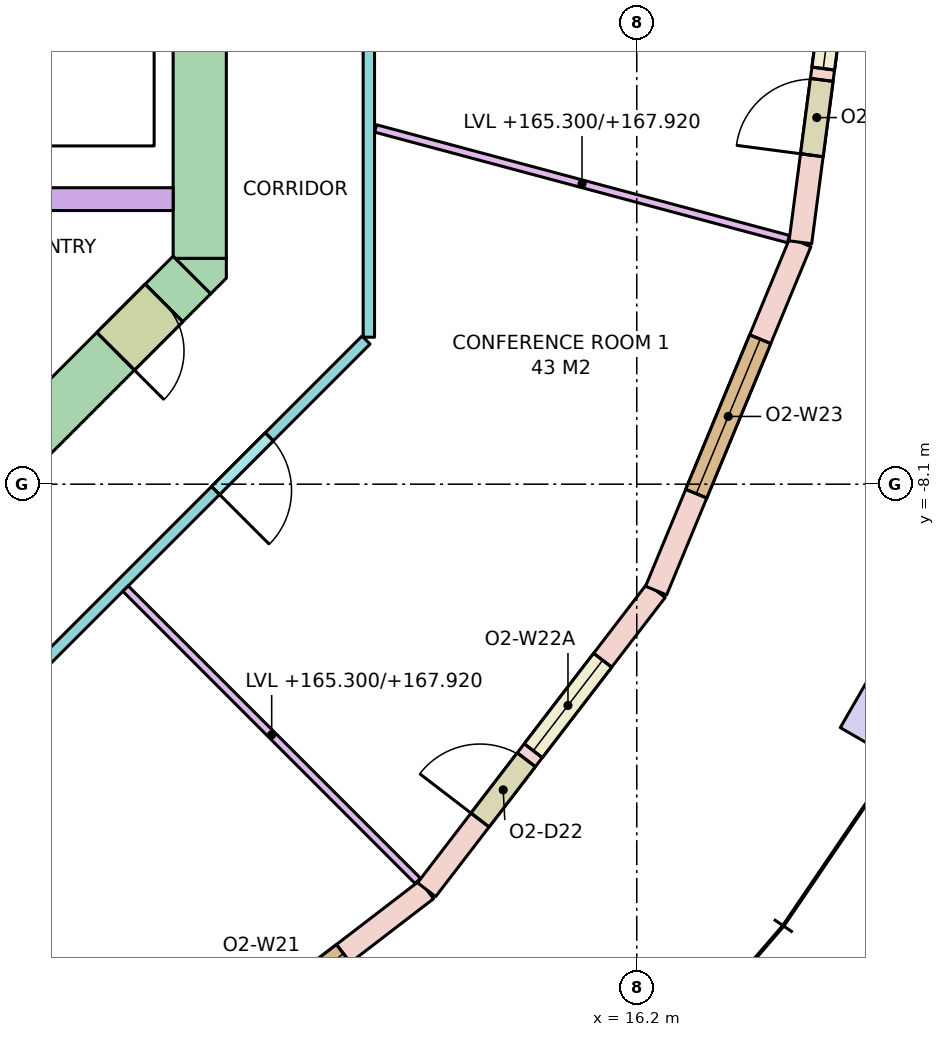
"""IFC4 building model, lengths in metres.
Left out: names, types, materials, properties, quantities, classifications, styles, units other than length and angle.
Written with IfcOpenShell. Run it as: python <this file> out.ifc"""

import sys

from ifc_helpers import new_model, si_unit, direction, frame, frame_2d, origin, origin_2d, place, context, subcontext, project, spatial, polyline, rectangle, outline, extrude, element, fill, save


model = new_model("IFC4")
c1 = context("Model", 3, precision=1e-05, world=origin(), true_north=direction((0.0, 1.0)))
c2 = subcontext(c1, "Body", "Model", "MODEL_VIEW")
j1 = project(units=[si_unit("LENGTHUNIT", "METRE"), si_unit("PLANEANGLEUNIT", "RADIAN")], contexts=[c1])
p1 = place(None, origin())
s1 = spatial("IfcSite", under=j1, at=p1, CompositionType="ELEMENT")
p2 = place(p1, origin())
s2 = spatial("IfcBuilding", under=s1, at=p2, CompositionType="ELEMENT")
p3 = place(p2, frame((0.0, 0.0, 165.3)))
s3 = spatial("IfcBuildingStorey", under=s2, at=p3, CompositionType="ELEMENT", Elevation=165.3)
p4 = place(p3, frame((19.486, -11.25, 0.0), z_axis=(0.0, 0.0, 1.0), x_axis=(0.5, 0.866025403784, 0.0)))
e1 = element("IfcColumn", 1, at=p4, inside=s3, PredefinedType="COLUMN", context=c2, shape_type="SweptSolid", body=[
    extrude(rectangle(XDim=0.7, YDim=1.0, at=origin_2d()), origin(), (0.0, 0.0, 1.0), 3.7),
])
p5 = place(p3, frame((10.45, -5.13, -0.28), z_axis=(0.0, 0.0, 1.0), x_axis=(0.0, 1.0, 0.0)))
e2 = element("IfcWall", 2, at=p5, inside=s3, PredefinedType="SHEAR", context=c2, shape_type="SweptSolid", body=[
    extrude(rectangle(XDim=10.26, YDim=0.7, at=frame_2d((5.13, 0.0))), origin(), (0.0, 0.0, 1.0), 3.7),
])
p6 = place(p5, frame((4.13, 0.0, 0.28)))
e3 = element("IfcOpeningElement", 3, at=p6, cuts=e2, PredefinedType="OPENING", context=c2, shape_type="SweptSolid", body=[
    extrude(rectangle(XDim=2.0, YDim=2.1, at=frame_2d((1.0, 1.05))), frame((0.0, 0.36, 0.0), z_axis=(0.0, -1.0, 0.0), x_axis=(1.0, 0.0, 0.0)), (0.0, 0.0, 1.0), 0.72),
])
p7 = place(p3, frame((10.347, -5.347, -0.28), z_axis=(0.0, 0.0, 1.0), x_axis=(-0.707106781187, -0.707106781187, 0.0)))
e4 = element("IfcWall", 4, at=p7, inside=s3, PredefinedType="SHEAR", context=c2, shape_type="SweptSolid", body=[
    extrude(rectangle(XDim=4.243, YDim=0.7, at=frame_2d((2.121, 0.0))), origin(), (0.0, 0.0, 1.0), 3.7),
])
p8 = place(p7, frame((0.52, 0.0, 0.28)))
e5 = element("IfcOpeningElement", 5, at=p8, cuts=e4, PredefinedType="OPENING", context=c2, shape_type="SweptSolid", body=[
    extrude(rectangle(XDim=0.9, YDim=2.1, at=frame_2d((0.45, 1.05))), frame((0.0, 0.36, 0.0), z_axis=(0.0, -1.0, 0.0), x_axis=(1.0, 0.0, 0.0)), (0.0, 0.0, 1.0), 0.72),
])
p9 = place(p3, frame((0.0, 0.0, -0.28)))
e6 = element("IfcWall", 6, at=p9, inside=s3, PredefinedType="SHEAR", context=c2, shape_type="SweptSolid", body=[
    extrude(outline(polyline([(10.8, -5.39), (10.595, -5.595), (10.595, -5.595), (10.595, -5.595), (10.13, -5.13), (10.8, -5.13), (10.8, -5.13), (10.8, -5.39)])), origin(), (0.0, 0.0, 1.0), 3.7),
])
p10 = place(p3, frame((2.0, -4.35, 0.0), z_axis=(0.0, 0.0, 1.0), x_axis=(1.0, 0.0, 0.0)))
e7 = element("IfcWall", 7, at=p10, inside=s3, PredefinedType="SOLIDWALL", context=c2, shape_type="SweptSolid", body=[
    extrude(rectangle(XDim=8.1, YDim=0.3, at=frame_2d((4.05, 0.0))), origin(), (0.0, 0.0, 1.0), 3.42),
])
p11 = place(p3, frame((9.5, -16.455, 0.0), z_axis=(0.0, 0.0, 1.0), x_axis=(0.793348024649, 0.608768356425, 0.0)))
e8 = element("IfcWall", 8, at=p11, inside=s3, PredefinedType="STANDARD", context=c2, shape_type="SweptSolid", body=[
    extrude(rectangle(XDim=4.96, YDim=0.3, at=frame_2d((2.48, 0.0))), origin(), (0.0, 0.0, 1.0), 3.42),
])
p12 = place(p11, frame((1.38, 0.0, 0.8)))
e9 = element("IfcOpeningElement", 9, at=p12, cuts=e8, PredefinedType="OPENING", context=c2, shape_type="SweptSolid", body=[
    extrude(rectangle(XDim=2.2, YDim=2.4, at=frame_2d((1.1, 1.2))), frame((0.0, 0.16, 0.0), z_axis=(0.0, -1.0, 0.0), x_axis=(1.0, 0.0, 0.0)), (0.0, 0.0, 1.0), 0.32),
])
p13 = place(p3, frame((13.435, -13.435, 0.0), z_axis=(0.0, 0.0, 1.0), x_axis=(0.608768356425, 0.793348024649, 0.0)))
e10 = element("IfcWall", 10, at=p13, inside=s3, PredefinedType="STANDARD", context=c2, shape_type="SweptSolid", body=[
    extrude(rectangle(XDim=4.96, YDim=0.3, at=frame_2d((2.48, 0.0))), origin(), (0.0, 0.0, 1.0), 3.42),
])
p14 = place(p13, frame((1.155, 0.0, 0.0)))
e11 = element("IfcOpeningElement", 11, at=p14, cuts=e10, PredefinedType="OPENING", context=c2, shape_type="SweptSolid", body=[
    extrude(rectangle(XDim=1.0, YDim=2.4, at=frame_2d((0.5, 1.2))), frame((0.0, 0.16, 0.0), z_axis=(0.0, -1.0, 0.0), x_axis=(1.0, 0.0, 0.0)), (0.0, 0.0, 1.0), 0.32),
])
p15 = place(p13, frame((2.305, 0.0, 0.8)))
e12 = element("IfcOpeningElement", 12, at=p15, cuts=e10, PredefinedType="OPENING", context=c2, shape_type="SweptSolid", body=[
    extrude(rectangle(XDim=1.5, YDim=2.4, at=frame_2d((0.75, 1.2))), frame((0.0, 0.16, 0.0), z_axis=(0.0, -1.0, 0.0), x_axis=(1.0, 0.0, 0.0)), (0.0, 0.0, 1.0), 0.32),
])
p16 = place(p3, frame((16.455, -9.5, 0.0), z_axis=(0.0, 0.0, 1.0), x_axis=(0.382650301762, 0.923893254961, 0.0)))
e13 = element("IfcWall", 13, at=p16, inside=s3, PredefinedType="STANDARD", context=c2, shape_type="SweptSolid", body=[
    extrude(rectangle(XDim=4.96, YDim=0.3, at=frame_2d((2.48, 0.0))), origin(), (0.0, 0.0, 1.0), 3.42),
])
p17 = place(p16, frame((1.38, 0.0, 0.8)))
e14 = element("IfcOpeningElement", 14, at=p17, cuts=e13, PredefinedType="OPENING", context=c2, shape_type="SweptSolid", body=[
    extrude(rectangle(XDim=2.2, YDim=2.4, at=frame_2d((1.1, 1.2))), frame((0.0, 0.16, 0.0), z_axis=(0.0, -1.0, 0.0), x_axis=(1.0, 0.0, 0.0)), (0.0, 0.0, 1.0), 0.32),
])
p18 = place(p3, frame((18.353, -4.917, 0.0), z_axis=(0.0, 0.0, 1.0), x_axis=(0.130538549191, 0.991443234469, 0.0)))
e15 = element("IfcWall", 15, at=p18, inside=s3, PredefinedType="STANDARD", context=c2, shape_type="SweptSolid", body=[
    extrude(rectangle(XDim=4.96, YDim=0.3, at=frame_2d((2.48, 0.0))), origin(), (0.0, 0.0, 1.0), 3.42),
])
p19 = place(p18, frame((1.155, 0.0, 0.0)))
e16 = element("IfcOpeningElement", 16, at=p19, cuts=e15, PredefinedType="OPENING", context=c2, shape_type="SweptSolid", body=[
    extrude(rectangle(XDim=1.0, YDim=2.4, at=frame_2d((0.5, 1.2))), frame((0.0, 0.16, 0.0), z_axis=(0.0, -1.0, 0.0), x_axis=(1.0, 0.0, 0.0)), (0.0, 0.0, 1.0), 0.32),
])
p20 = place(p18, frame((2.305, 0.0, 0.8)))
e17 = element("IfcOpeningElement", 17, at=p20, cuts=e15, PredefinedType="OPENING", context=c2, shape_type="SweptSolid", body=[
    extrude(rectangle(XDim=1.5, YDim=2.4, at=frame_2d((0.75, 1.2))), frame((0.0, 0.16, 0.0), z_axis=(0.0, -1.0, 0.0), x_axis=(1.0, 0.0, 0.0)), (0.0, 0.0, 1.0), 0.32),
])
p21 = place(p3, frame((12.638, -6.204, 0.0), z_axis=(0.0, 0.0, 1.0), x_axis=(-0.707106781187, -0.707106781187, 0.0)))
e18 = element("IfcWall", 18, at=p21, inside=s3, PredefinedType="PARTITIONING", context=c2, shape_type="SweptSolid", body=[
    extrude(rectangle(XDim=6.271, YDim=0.15, at=frame_2d((3.135, 0.0))), origin(), (0.0, 0.0, 1.0), 2.62),
])
p22 = place(p21, frame((1.8, 0.0, 0.0)))
e19 = element("IfcOpeningElement", 19, at=p22, cuts=e18, PredefinedType="OPENING", context=c2, shape_type="SweptSolid", body=[
    extrude(rectangle(XDim=1.0, YDim=2.1, at=frame_2d((0.5, 1.05))), frame((0.0, 0.085, 0.0), z_axis=(0.0, -1.0, 0.0), x_axis=(1.0, 0.0, 0.0)), (0.0, 0.0, 1.0), 0.17),
])
p23 = place(p3, frame((12.675, 6.167, 0.0), z_axis=(0.0, 0.0, 1.0), x_axis=(0.0, -1.0, 0.0)))
e20 = element("IfcWall", 20, at=p23, inside=s3, PredefinedType="PARTITIONING", context=c2, shape_type="SweptSolid", body=[
    extrude(rectangle(XDim=12.333, YDim=0.15, at=frame_2d((6.167, 0.0))), origin(), (0.0, 0.0, 1.0), 2.62),
])
p24 = place(p23, frame((7.416, 0.0, 0.0)))
e21 = element("IfcOpeningElement", 21, at=p24, cuts=e20, PredefinedType="OPENING", context=c2, shape_type="SweptSolid", body=[
    extrude(rectangle(XDim=0.9, YDim=2.1, at=frame_2d((0.45, 1.05))), frame((0.0, 0.085, 0.0), z_axis=(0.0, -1.0, 0.0), x_axis=(1.0, 0.0, 0.0)), (0.0, 0.0, 1.0), 0.17),
])
p25 = place(p23, frame((3.568, 0.0, 0.0)))
e22 = element("IfcOpeningElement", 22, at=p25, cuts=e20, PredefinedType="OPENING", context=c2, shape_type="SweptSolid", body=[
    extrude(rectangle(XDim=1.8, YDim=2.1, at=frame_2d((0.9, 1.05))), frame((0.0, 0.085, 0.0), z_axis=(0.0, -1.0, 0.0), x_axis=(1.0, 0.0, 0.0)), (0.0, 0.0, 1.0), 0.17),
])
p26 = place(p23, frame((0.96, 0.0, 0.0)))
e23 = element("IfcOpeningElement", 23, at=p26, cuts=e20, PredefinedType="OPENING", context=c2, shape_type="SweptSolid", body=[
    extrude(rectangle(XDim=0.9, YDim=2.1, at=frame_2d((0.45, 1.05))), frame((0.0, 0.085, 0.0), z_axis=(0.0, -1.0, 0.0), x_axis=(1.0, 0.0, 0.0)), (0.0, 0.0, 1.0), 0.17),
])
p27 = place(p3, frame((9.474, -9.474, 0.0), z_axis=(0.0, 0.0, 1.0), x_axis=(0.707106781187, -0.707106781187, 0.0)))
e24 = element("IfcWall", 24, at=p27, inside=s3, PredefinedType="PARTITIONING", context=c2, shape_type="SweptSolid", body=[
    extrude(rectangle(XDim=5.439, YDim=0.1, at=frame_2d((2.719, 0.0))), origin(), (0.0, 0.0, 1.0), 2.62),
])
p28 = place(p3, frame((12.764, -3.42, 0.0), z_axis=(0.0, 0.0, 1.0), x_axis=(0.965925759926, -0.258819292773, 0.0)))
e25 = element("IfcWall", 25, at=p28, inside=s3, PredefinedType="PARTITIONING", context=c2, shape_type="SweptSolid", body=[
    extrude(rectangle(XDim=5.622, YDim=0.1, at=frame_2d((2.811, 0.0))), origin(), (0.0, 0.0, 1.0), 2.62),
])
p29 = place(p12, origin())
e26 = element("IfcWindow", 26, at=p29, inside=s3, PartitioningType="SINGLE_PANEL", PredefinedType="WINDOW", context=c2, shape_type="SweptSolid", body=[
    extrude(rectangle(XDim=2.2, YDim=2.4, at=frame_2d((1.1, 1.2))), frame((0.0, 0.03, 0.0), z_axis=(0.0, -1.0, 0.0), x_axis=(1.0, 0.0, 0.0)), (0.0, 0.0, 1.0), 0.06),
])
fill(e9, e26)
p30 = place(p14, origin())
e27 = element("IfcDoor", 27, at=p30, inside=s3, OperationType="SINGLE_SWING_LEFT", PredefinedType="DOOR", context=c2, shape_type="SweptSolid", body=[
    extrude(rectangle(XDim=1.0, YDim=2.4, at=frame_2d((0.5, 1.2))), frame((0.0, 0.025, 0.0), z_axis=(0.0, -1.0, 0.0), x_axis=(1.0, 0.0, 0.0)), (0.0, 0.0, 1.0), 0.05),
])
fill(e11, e27)
p31 = place(p15, origin())
e28 = element("IfcWindow", 28, at=p31, inside=s3, PartitioningType="SINGLE_PANEL", PredefinedType="WINDOW", context=c2, shape_type="SweptSolid", body=[
    extrude(rectangle(XDim=1.5, YDim=2.4, at=frame_2d((0.75, 1.2))), frame((0.0, 0.03, 0.0), z_axis=(0.0, -1.0, 0.0), x_axis=(1.0, 0.0, 0.0)), (0.0, 0.0, 1.0), 0.06),
])
fill(e12, e28)
p32 = place(p17, origin())
e29 = element("IfcWindow", 29, at=p32, inside=s3, PartitioningType="SINGLE_PANEL", PredefinedType="WINDOW", context=c2, shape_type="SweptSolid", body=[
    extrude(rectangle(XDim=2.2, YDim=2.4, at=frame_2d((1.1, 1.2))), frame((0.0, 0.03, 0.0), z_axis=(0.0, -1.0, 0.0), x_axis=(1.0, 0.0, 0.0)), (0.0, 0.0, 1.0), 0.06),
])
fill(e14, e29)
p33 = place(p19, origin())
e30 = element("IfcDoor", 30, at=p33, inside=s3, OperationType="SINGLE_SWING_LEFT", PredefinedType="DOOR", context=c2, shape_type="SweptSolid", body=[
    extrude(rectangle(XDim=1.0, YDim=2.4, at=frame_2d((0.5, 1.2))), frame((0.0, 0.025, 0.0), z_axis=(0.0, -1.0, 0.0), x_axis=(1.0, 0.0, 0.0)), (0.0, 0.0, 1.0), 0.05),
])
fill(e16, e30)
p34 = place(p20, origin())
e31 = element("IfcWindow", 31, at=p34, inside=s3, PartitioningType="SINGLE_PANEL", PredefinedType="WINDOW", context=c2, shape_type="SweptSolid", body=[
    extrude(rectangle(XDim=1.5, YDim=2.4, at=frame_2d((0.75, 1.2))), frame((0.0, 0.03, 0.0), z_axis=(0.0, -1.0, 0.0), x_axis=(1.0, 0.0, 0.0)), (0.0, 0.0, 1.0), 0.06),
])
fill(e17, e31)
p35 = place(p8, origin())
e32 = element("IfcDoor", 32, at=p35, inside=s3, OperationType="SINGLE_SWING_RIGHT", PredefinedType="DOOR", context=c2, shape_type="SweptSolid", body=[
    extrude(rectangle(XDim=0.9, YDim=2.1, at=frame_2d((0.45, 1.05))), frame((0.0, 0.025, 0.0), z_axis=(0.0, -1.0, 0.0), x_axis=(1.0, 0.0, 0.0)), (0.0, 0.0, 1.0), 0.05),
])
fill(e5, e32)
p36 = place(p22, origin())
e33 = element("IfcDoor", 33, at=p36, inside=s3, OperationType="SINGLE_SWING_RIGHT", PredefinedType="DOOR", context=c2, shape_type="SweptSolid", body=[
    extrude(rectangle(XDim=1.0, YDim=2.1, at=frame_2d((0.5, 1.05))), frame((0.0, 0.025, 0.0), z_axis=(0.0, -1.0, 0.0), x_axis=(1.0, 0.0, 0.0)), (0.0, 0.0, 1.0), 0.05),
])
fill(e19, e33)
save(model, sys.argv[1])
